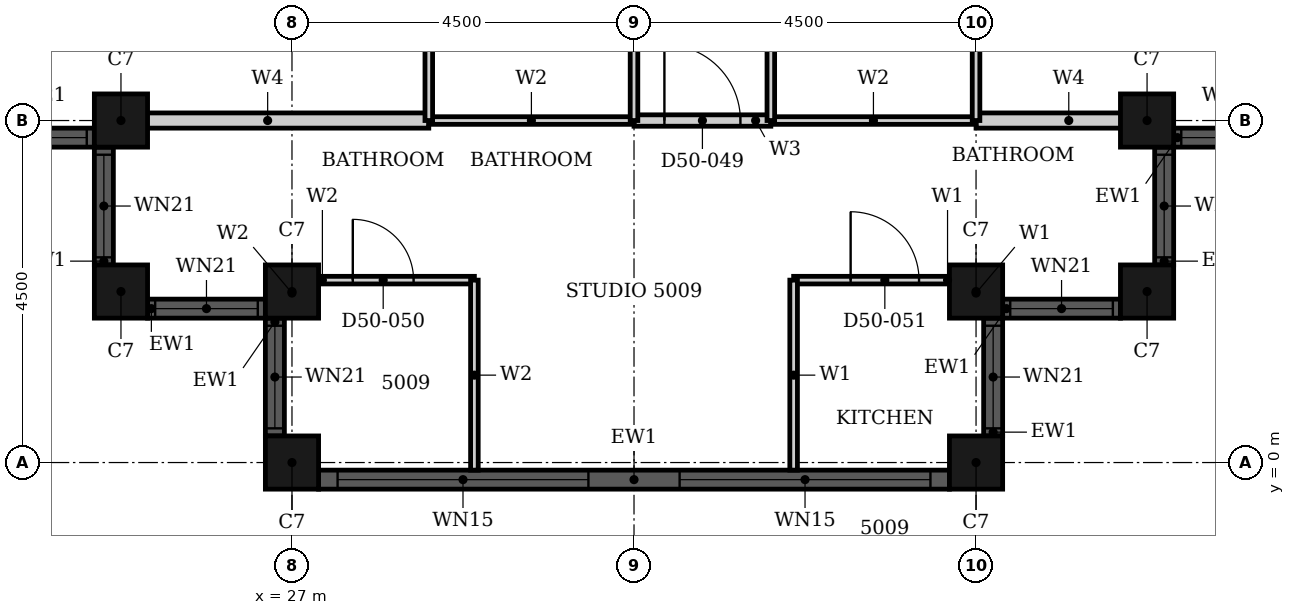
"""IFC4 building model, lengths in metres.
Left out: names, types, materials, properties, quantities, classifications, styles, units other than length and angle.
Written with IfcOpenShell. Run it as: python <this file> out.ifc"""

import sys

from ifc_helpers import new_model, si_unit, direction, frame, frame_2d, origin, origin_2d, place, context, subcontext, project, spatial, rectangle, hollow_rectangle, extrude, element, fill, save


model = new_model("IFC4")
c1 = context("Model", 3, precision=1e-05, world=origin(), true_north=direction((0.0, 1.0)))
c2 = subcontext(c1, "Body", "Model", "MODEL_VIEW")
j1 = project(units=[si_unit("LENGTHUNIT", "METRE"), si_unit("PLANEANGLEUNIT", "RADIAN")], contexts=[c1])
p1 = place(None, origin())
s1 = spatial("IfcSite", under=j1, at=p1, CompositionType="ELEMENT")
p2 = place(p1, origin())
s2 = spatial("IfcBuilding", under=s1, at=p2, CompositionType="ELEMENT")
p3 = place(p2, frame((0.0, 0.0, 199.8)))
s3 = spatial("IfcBuildingStorey", under=s2, at=p3, CompositionType="ELEMENT", Elevation=199.8)
for number, where, z_axis, x_axis in (
    (1, (24.75, 4.5, 0.0), (0.0, 0.0, 1.0), (1.0, 0.0, 0.0)),
    (2, (24.75, 2.25, 0.0), (0.0, 0.0, 1.0), (1.0, 0.0, 0.0)),
    (3, (27.0, 2.25, 0.0), (0.0, 0.0, 1.0), (1.0, 0.0, 0.0)),
    (4, (27.0, 0.0, 0.0), (0.0, 0.0, 1.0), (1.0, 0.0, 0.0)),
    (5, (36.0, 0.0, 0.0), (0.0, 0.0, 1.0), (1.0, 0.0, 0.0)),
    (6, (36.0, 2.25, 0.0), (0.0, 0.0, 1.0), (1.0, 0.0, 0.0)),
    (7, (38.25, 2.25, 0.0), (0.0, 0.0, 1.0), (1.0, 0.0, 0.0)),
    (8, (38.25, 4.5, 0.0), (0.0, 0.0, 1.0), (1.0, 0.0, 0.0)),
):
    element("IfcColumn", number, at=place(p3, frame(where, z_axis=z_axis, x_axis=x_axis)), inside=s3, PredefinedType="COLUMN", context=c2, shape_type="SweptSolid", body=[
        extrude(hollow_rectangle(XDim=0.7, YDim=0.7, WallThickness=0.022, at=origin_2d()), origin(), (0.0, 0.0, 1.0), 3.7),
    ])
p4 = place(p3, frame((22.85, 4.275, 0.0), z_axis=(0.0, 0.0, 1.0), x_axis=(1.0, 0.0, 0.0)))
e9 = element("IfcWall", 9, at=p4, inside=s3, PredefinedType="SOLIDWALL", context=c2, shape_type="SweptSolid", body=[
    extrude(rectangle(XDim=1.55, YDim=0.25, at=frame_2d((0.775, 0.0))), origin(), (0.0, 0.0, 1.0), 3.7),
])
p5 = place(p4, frame((0.1, 0.0, 0.9)))
e10 = element("IfcOpeningElement", 10, at=p5, cuts=e9, PredefinedType="OPENING", context=c2, shape_type="SweptSolid", body=[
    extrude(rectangle(XDim=1.35, YDim=1.85, at=frame_2d((0.675, 0.925))), frame((0.0, 0.135, 0.0), z_axis=(0.0, -1.0, 0.0), x_axis=(1.0, 0.0, 0.0)), (0.0, 0.0, 1.0), 0.27),
])
p6 = place(p3, frame((24.525, 4.15, 0.0), z_axis=(0.0, 0.0, 1.0), x_axis=(0.0, -1.0, 0.0)))
e11 = element("IfcWall", 11, at=p6, inside=s3, PredefinedType="SOLIDWALL", context=c2, shape_type="SweptSolid", body=[
    extrude(rectangle(XDim=1.55, YDim=0.25, at=frame_2d((0.775, 0.0))), origin(), (0.0, 0.0, 1.0), 3.7),
])
p7 = place(p6, frame((0.1, 0.0, 0.9)))
e12 = element("IfcOpeningElement", 12, at=p7, cuts=e11, PredefinedType="OPENING", context=c2, shape_type="SweptSolid", body=[
    extrude(rectangle(XDim=1.35, YDim=1.85, at=frame_2d((0.675, 0.925))), frame((0.0, 0.135, 0.0), z_axis=(0.0, -1.0, 0.0), x_axis=(1.0, 0.0, 0.0)), (0.0, 0.0, 1.0), 0.27),
])
p8 = place(p3, frame((25.1, 2.025, 0.0), z_axis=(0.0, 0.0, 1.0), x_axis=(1.0, 0.0, 0.0)))
e13 = element("IfcWall", 13, at=p8, inside=s3, PredefinedType="SOLIDWALL", context=c2, shape_type="SweptSolid", body=[
    extrude(rectangle(XDim=1.55, YDim=0.25, at=frame_2d((0.775, 0.0))), origin(), (0.0, 0.0, 1.0), 3.7),
])
p9 = place(p8, frame((0.1, 0.0, 0.9)))
e14 = element("IfcOpeningElement", 14, at=p9, cuts=e13, PredefinedType="OPENING", context=c2, shape_type="SweptSolid", body=[
    extrude(rectangle(XDim=1.35, YDim=1.85, at=frame_2d((0.675, 0.925))), frame((0.0, 0.135, 0.0), z_axis=(0.0, -1.0, 0.0), x_axis=(1.0, 0.0, 0.0)), (0.0, 0.0, 1.0), 0.27),
])
p10 = place(p3, frame((26.775, 1.9, 0.0), z_axis=(0.0, 0.0, 1.0), x_axis=(0.0, -1.0, 0.0)))
e15 = element("IfcWall", 15, at=p10, inside=s3, PredefinedType="SOLIDWALL", context=c2, shape_type="SweptSolid", body=[
    extrude(rectangle(XDim=1.55, YDim=0.25, at=frame_2d((0.775, 0.0))), origin(), (0.0, 0.0, 1.0), 3.7),
])
p11 = place(p10, frame((0.1, 0.0, 0.9)))
e16 = element("IfcOpeningElement", 16, at=p11, cuts=e15, PredefinedType="OPENING", context=c2, shape_type="SweptSolid", body=[
    extrude(rectangle(XDim=1.35, YDim=1.85, at=frame_2d((0.675, 0.925))), frame((0.0, 0.135, 0.0), z_axis=(0.0, -1.0, 0.0), x_axis=(1.0, 0.0, 0.0)), (0.0, 0.0, 1.0), 0.27),
])
p12 = place(p3, frame((27.35, -0.225, 0.0), z_axis=(0.0, 0.0, 1.0), x_axis=(1.0, 0.0, 0.0)))
e17 = element("IfcWall", 17, at=p12, inside=s3, PredefinedType="SOLIDWALL", context=c2, shape_type="SweptSolid", body=[
    extrude(rectangle(XDim=8.3, YDim=0.25, at=frame_2d((4.15, 0.0))), origin(), (0.0, 0.0, 1.0), 3.7),
])
p13 = place(p12, frame((0.25, 0.0, 0.45)))
e18 = element("IfcOpeningElement", 18, at=p13, cuts=e17, PredefinedType="OPENING", context=c2, shape_type="SweptSolid", body=[
    extrude(rectangle(XDim=3.3, YDim=2.3, at=frame_2d((1.65, 1.15))), frame((0.0, 0.135, 0.0), z_axis=(0.0, -1.0, 0.0), x_axis=(1.0, 0.0, 0.0)), (0.0, 0.0, 1.0), 0.27),
])
p14 = place(p12, frame((4.75, 0.0, 0.45)))
e19 = element("IfcOpeningElement", 19, at=p14, cuts=e17, PredefinedType="OPENING", context=c2, shape_type="SweptSolid", body=[
    extrude(rectangle(XDim=3.3, YDim=2.3, at=frame_2d((1.65, 1.15))), frame((0.0, 0.135, 0.0), z_axis=(0.0, -1.0, 0.0), x_axis=(1.0, 0.0, 0.0)), (0.0, 0.0, 1.0), 0.27),
])
p15 = place(p3, frame((36.225, 0.35, 0.0), z_axis=(0.0, 0.0, 1.0), x_axis=(0.0, 1.0, 0.0)))
e20 = element("IfcWall", 20, at=p15, inside=s3, PredefinedType="SOLIDWALL", context=c2, shape_type="SweptSolid", body=[
    extrude(rectangle(XDim=1.55, YDim=0.25, at=frame_2d((0.775, 0.0))), origin(), (0.0, 0.0, 1.0), 3.7),
])
p16 = place(p15, frame((0.1, 0.0, 0.9)))
e21 = element("IfcOpeningElement", 21, at=p16, cuts=e20, PredefinedType="OPENING", context=c2, shape_type="SweptSolid", body=[
    extrude(rectangle(XDim=1.35, YDim=1.85, at=frame_2d((0.675, 0.925))), frame((0.0, 0.135, 0.0), z_axis=(0.0, -1.0, 0.0), x_axis=(1.0, 0.0, 0.0)), (0.0, 0.0, 1.0), 0.27),
])
p17 = place(p3, frame((36.35, 2.025, 0.0), z_axis=(0.0, 0.0, 1.0), x_axis=(1.0, 0.0, 0.0)))
e22 = element("IfcWall", 22, at=p17, inside=s3, PredefinedType="SOLIDWALL", context=c2, shape_type="SweptSolid", body=[
    extrude(rectangle(XDim=1.55, YDim=0.25, at=frame_2d((0.775, 0.0))), origin(), (0.0, 0.0, 1.0), 3.7),
])
p18 = place(p17, frame((0.1, 0.0, 0.9)))
e23 = element("IfcOpeningElement", 23, at=p18, cuts=e22, PredefinedType="OPENING", context=c2, shape_type="SweptSolid", body=[
    extrude(rectangle(XDim=1.35, YDim=1.85, at=frame_2d((0.675, 0.925))), frame((0.0, 0.135, 0.0), z_axis=(0.0, -1.0, 0.0), x_axis=(1.0, 0.0, 0.0)), (0.0, 0.0, 1.0), 0.27),
])
p19 = place(p3, frame((38.475, 2.6, 0.0), z_axis=(0.0, 0.0, 1.0), x_axis=(0.0, 1.0, 0.0)))
e24 = element("IfcWall", 24, at=p19, inside=s3, PredefinedType="SOLIDWALL", context=c2, shape_type="SweptSolid", body=[
    extrude(rectangle(XDim=1.55, YDim=0.25, at=frame_2d((0.775, 0.0))), origin(), (0.0, 0.0, 1.0), 3.7),
])
p20 = place(p19, frame((0.1, 0.0, 0.9)))
e25 = element("IfcOpeningElement", 25, at=p20, cuts=e24, PredefinedType="OPENING", context=c2, shape_type="SweptSolid", body=[
    extrude(rectangle(XDim=1.35, YDim=1.85, at=frame_2d((0.675, 0.925))), frame((0.0, 0.135, 0.0), z_axis=(0.0, -1.0, 0.0), x_axis=(1.0, 0.0, 0.0)), (0.0, 0.0, 1.0), 0.27),
])
p21 = place(p3, frame((38.6, 4.275, 0.0), z_axis=(0.0, 0.0, 1.0), x_axis=(1.0, 0.0, 0.0)))
e26 = element("IfcWall", 26, at=p21, inside=s3, PredefinedType="SOLIDWALL", context=c2, shape_type="SweptSolid", body=[
    extrude(rectangle(XDim=1.55, YDim=0.25, at=frame_2d((0.775, 0.0))), origin(), (0.0, 0.0, 1.0), 3.7),
])
p22 = place(p21, frame((0.1, 0.0, 0.9)))
e27 = element("IfcOpeningElement", 27, at=p22, cuts=e26, PredefinedType="OPENING", context=c2, shape_type="SweptSolid", body=[
    extrude(rectangle(XDim=1.35, YDim=1.85, at=frame_2d((0.675, 0.925))), frame((0.0, 0.135, 0.0), z_axis=(0.0, -1.0, 0.0), x_axis=(1.0, 0.0, 0.0)), (0.0, 0.0, 1.0), 0.27),
])
p23 = place(p3, frame((31.5, 4.5, 0.0), z_axis=(0.0, 0.0, 1.0), x_axis=(1.0, 0.0, 0.0)))
e28 = element("IfcWall", 28, at=p23, inside=s3, PredefinedType="PARTITIONING", context=c2, shape_type="SweptSolid", body=[
    extrude(rectangle(XDim=1.8, YDim=0.15, at=frame_2d((0.9, 0.0))), origin(), (0.0, 0.0, 1.0), 3.4),
])
p24 = place(p23, frame((0.4, 0.0, 0.0)))
e29 = element("IfcOpeningElement", 29, at=p24, cuts=e28, PredefinedType="OPENING", context=c2, shape_type="SweptSolid", body=[
    extrude(rectangle(XDim=1.0, YDim=2.2, at=frame_2d((0.5, 1.1))), frame((0.0, 0.085, 0.0), z_axis=(0.0, -1.0, 0.0), x_axis=(1.0, 0.0, 0.0)), (0.0, 0.0, 1.0), 0.17),
])
p25 = place(p3, frame((33.6, 2.4, 0.0), z_axis=(0.0, 0.0, 1.0), x_axis=(1.0, 0.0, 0.0)))
e30 = element("IfcWall", 30, at=p25, inside=s3, PredefinedType="PARTITIONING", context=c2, shape_type="SweptSolid", body=[
    extrude(rectangle(XDim=2.4, YDim=0.1, at=frame_2d((1.2, 0.0))), origin(), (0.0, 0.0, 1.0), 3.4),
])
p26 = place(p25, frame((0.75, 0.0, 0.0)))
e31 = element("IfcOpeningElement", 31, at=p26, cuts=e30, PredefinedType="OPENING", context=c2, shape_type="SweptSolid", body=[
    extrude(rectangle(XDim=0.9, YDim=2.1, at=frame_2d((0.45, 1.05))), frame((0.0, 0.06, 0.0), z_axis=(0.0, -1.0, 0.0), x_axis=(1.0, 0.0, 0.0)), (0.0, 0.0, 1.0), 0.12),
])
p27 = place(p3, frame((33.6, -0.1, 0.0), z_axis=(0.0, 0.0, 1.0), x_axis=(0.0, 1.0, 0.0)))
e32 = element("IfcWall", 32, at=p27, inside=s3, PredefinedType="PARTITIONING", context=c2, shape_type="SweptSolid", body=[
    extrude(rectangle(XDim=2.5, YDim=0.1, at=frame_2d((1.25, 0.0))), origin(), (0.0, 0.0, 1.0), 3.4),
])
p28 = place(p3, frame((36.0, 2.06, 0.0), z_axis=(0.0, 0.0, 1.0), x_axis=(0.0, 1.0, 0.0)))
e33 = element("IfcWall", 33, at=p28, inside=s3, PredefinedType="PARTITIONING", context=c2, shape_type="SweptSolid", body=[
    extrude(rectangle(XDim=0.34, YDim=0.1, at=frame_2d((0.17, 0.0))), origin(), (0.0, 0.0, 1.0), 3.4),
])
p29 = place(p3, frame((36.0, 4.5, 0.0), z_axis=(0.0, 0.0, 1.0), x_axis=(1.0, 0.0, 0.0)))
e34 = element("IfcWall", 34, at=p29, inside=s3, PredefinedType="PARTITIONING", context=c2, shape_type="SweptSolid", body=[
    extrude(rectangle(XDim=2.44, YDim=0.2, at=frame_2d((1.22, 0.0))), origin(), (0.0, 0.0, 1.0), 3.4),
])
p30 = place(p3, frame((24.56, 4.5, 0.0), z_axis=(0.0, 0.0, 1.0), x_axis=(1.0, 0.0, 0.0)))
e35 = element("IfcWall", 35, at=p30, inside=s3, PredefinedType="PARTITIONING", context=c2, shape_type="SweptSolid", body=[
    extrude(rectangle(XDim=4.24, YDim=0.2, at=frame_2d((2.12, 0.0))), origin(), (0.0, 0.0, 1.0), 3.4),
])
p31 = place(p3, frame((27.0, 2.4, 0.0), z_axis=(0.0, 0.0, 1.0), x_axis=(1.0, 0.0, 0.0)))
e36 = element("IfcWall", 36, at=p31, inside=s3, PredefinedType="PARTITIONING", context=c2, shape_type="SweptSolid", body=[
    extrude(rectangle(XDim=2.4, YDim=0.1, at=frame_2d((1.2, 0.0))), origin(), (0.0, 0.0, 1.0), 3.4),
])
p32 = place(p31, frame((0.8, 0.0, 0.0)))
e37 = element("IfcOpeningElement", 37, at=p32, cuts=e36, PredefinedType="OPENING", context=c2, shape_type="SweptSolid", body=[
    extrude(rectangle(XDim=0.8, YDim=2.1, at=frame_2d((0.4, 1.05))), frame((0.0, 0.06, 0.0), z_axis=(0.0, -1.0, 0.0), x_axis=(1.0, 0.0, 0.0)), (0.0, 0.0, 1.0), 0.12),
])
for number, where, z_axis, x_axis in (
    (38, (33.3, 4.5, 0.0), (0.0, 0.0, 1.0), (1.0, 0.0, 0.0)),
    (39, (28.8, 4.5, 0.0), (0.0, 0.0, 1.0), (1.0, 0.0, 0.0)),
):
    element("IfcWall", number, at=place(p3, frame(where, z_axis=z_axis, x_axis=x_axis)), inside=s3, PredefinedType="PARTITIONING", context=c2, shape_type="SweptSolid", body=[
        extrude(rectangle(XDim=2.7, YDim=0.1, at=frame_2d((1.35, 0.0))), origin(), (0.0, 0.0, 1.0), 3.4),
    ])
p33 = place(p3, frame((27.0, 2.06, 0.0), z_axis=(0.0, 0.0, 1.0), x_axis=(0.0, 1.0, 0.0)))
e40 = element("IfcWall", 40, at=p33, inside=s3, PredefinedType="PARTITIONING", context=c2, shape_type="SweptSolid", body=[
    extrude(rectangle(XDim=0.34, YDim=0.1, at=frame_2d((0.17, 0.0))), origin(), (0.0, 0.0, 1.0), 3.4),
])
p34 = place(p3, frame((28.8, 4.5, 0.0), z_axis=(0.0, 0.0, 1.0), x_axis=(0.0, 1.0, 0.0)))
e41 = element("IfcWall", 41, at=p34, inside=s3, PredefinedType="PARTITIONING", context=c2, shape_type="SweptSolid", body=[
    extrude(rectangle(XDim=2.4, YDim=0.1, at=frame_2d((1.2, 0.0))), origin(), (0.0, 0.0, 1.0), 3.4),
])
p35 = place(p3, frame((29.4, -0.1, 0.0), z_axis=(0.0, 0.0, 1.0), x_axis=(0.0, 1.0, 0.0)))
e42 = element("IfcWall", 42, at=p35, inside=s3, PredefinedType="PARTITIONING", context=c2, shape_type="SweptSolid", body=[
    extrude(rectangle(XDim=2.5, YDim=0.1, at=frame_2d((1.25, 0.0))), origin(), (0.0, 0.0, 1.0), 3.4),
])
p36 = place(p3, frame((31.5, 4.5, 0.0), z_axis=(0.0, 0.0, 1.0), x_axis=(0.0, 1.0, 0.0)))
e43 = element("IfcWall", 43, at=p36, inside=s3, PredefinedType="PARTITIONING", context=c2, shape_type="SweptSolid", body=[
    extrude(rectangle(XDim=2.4, YDim=0.1, at=frame_2d((1.2, 0.0))), origin(), (0.0, 0.0, 1.0), 2.68),
])
p37 = place(p3, frame((33.3, 4.5, 0.0), z_axis=(0.0, 0.0, 1.0), x_axis=(0.0, 1.0, 0.0)))
e44 = element("IfcWall", 44, at=p37, inside=s3, PredefinedType="PARTITIONING", context=c2, shape_type="SweptSolid", body=[
    extrude(rectangle(XDim=2.4, YDim=0.1, at=frame_2d((1.2, 0.0))), origin(), (0.0, 0.0, 1.0), 3.4),
])
p38 = place(p3, frame((36.0, 4.5, 0.0), z_axis=(0.0, 0.0, 1.0), x_axis=(0.0, 1.0, 0.0)))
e45 = element("IfcWall", 45, at=p38, inside=s3, PredefinedType="PARTITIONING", context=c2, shape_type="SweptSolid", body=[
    extrude(rectangle(XDim=2.4, YDim=0.1, at=frame_2d((1.2, 0.0))), origin(), (0.0, 0.0, 1.0), 2.68),
])
p39 = place(p5, origin())
e46 = element("IfcWindow", 46, at=p39, inside=s3, PartitioningType="SINGLE_PANEL", PredefinedType="WINDOW", context=c2, shape_type="SweptSolid", body=[
    extrude(rectangle(XDim=1.35, YDim=1.85, at=frame_2d((0.675, 0.925))), frame((0.0, 0.03, 0.0), z_axis=(0.0, -1.0, 0.0), x_axis=(1.0, 0.0, 0.0)), (0.0, 0.0, 1.0), 0.06),
])
fill(e10, e46)
p40 = place(p7, origin())
e47 = element("IfcWindow", 47, at=p40, inside=s3, PartitioningType="SINGLE_PANEL", PredefinedType="WINDOW", context=c2, shape_type="SweptSolid", body=[
    extrude(rectangle(XDim=1.35, YDim=1.85, at=frame_2d((0.675, 0.925))), frame((0.0, 0.03, 0.0), z_axis=(0.0, -1.0, 0.0), x_axis=(1.0, 0.0, 0.0)), (0.0, 0.0, 1.0), 0.06),
])
fill(e12, e47)
p41 = place(p9, origin())
e48 = element("IfcWindow", 48, at=p41, inside=s3, PartitioningType="SINGLE_PANEL", PredefinedType="WINDOW", context=c2, shape_type="SweptSolid", body=[
    extrude(rectangle(XDim=1.35, YDim=1.85, at=frame_2d((0.675, 0.925))), frame((0.0, 0.03, 0.0), z_axis=(0.0, -1.0, 0.0), x_axis=(1.0, 0.0, 0.0)), (0.0, 0.0, 1.0), 0.06),
])
fill(e14, e48)
p42 = place(p11, origin())
e49 = element("IfcWindow", 49, at=p42, inside=s3, PartitioningType="SINGLE_PANEL", PredefinedType="WINDOW", context=c2, shape_type="SweptSolid", body=[
    extrude(rectangle(XDim=1.35, YDim=1.85, at=frame_2d((0.675, 0.925))), frame((0.0, 0.03, 0.0), z_axis=(0.0, -1.0, 0.0), x_axis=(1.0, 0.0, 0.0)), (0.0, 0.0, 1.0), 0.06),
])
fill(e16, e49)
p43 = place(p13, origin())
e50 = element("IfcWindow", 50, at=p43, inside=s3, PartitioningType="SINGLE_PANEL", PredefinedType="WINDOW", context=c2, shape_type="SweptSolid", body=[
    extrude(rectangle(XDim=3.3, YDim=2.3, at=frame_2d((1.65, 1.15))), frame((0.0, 0.03, 0.0), z_axis=(0.0, -1.0, 0.0), x_axis=(1.0, 0.0, 0.0)), (0.0, 0.0, 1.0), 0.06),
])
fill(e18, e50)
p44 = place(p14, origin())
e51 = element("IfcWindow", 51, at=p44, inside=s3, PartitioningType="SINGLE_PANEL", PredefinedType="WINDOW", context=c2, shape_type="SweptSolid", body=[
    extrude(rectangle(XDim=3.3, YDim=2.3, at=frame_2d((1.65, 1.15))), frame((0.0, 0.03, 0.0), z_axis=(0.0, -1.0, 0.0), x_axis=(1.0, 0.0, 0.0)), (0.0, 0.0, 1.0), 0.06),
])
fill(e19, e51)
p45 = place(p16, origin())
e52 = element("IfcWindow", 52, at=p45, inside=s3, PartitioningType="SINGLE_PANEL", PredefinedType="WINDOW", context=c2, shape_type="SweptSolid", body=[
    extrude(rectangle(XDim=1.35, YDim=1.85, at=frame_2d((0.675, 0.925))), frame((0.0, 0.03, 0.0), z_axis=(0.0, -1.0, 0.0), x_axis=(1.0, 0.0, 0.0)), (0.0, 0.0, 1.0), 0.06),
])
fill(e21, e52)
p46 = place(p18, origin())
e53 = element("IfcWindow", 53, at=p46, inside=s3, PartitioningType="SINGLE_PANEL", PredefinedType="WINDOW", context=c2, shape_type="SweptSolid", body=[
    extrude(rectangle(XDim=1.35, YDim=1.85, at=frame_2d((0.675, 0.925))), frame((0.0, 0.03, 0.0), z_axis=(0.0, -1.0, 0.0), x_axis=(1.0, 0.0, 0.0)), (0.0, 0.0, 1.0), 0.06),
])
fill(e23, e53)
p47 = place(p20, origin())
e54 = element("IfcWindow", 54, at=p47, inside=s3, PartitioningType="SINGLE_PANEL", PredefinedType="WINDOW", context=c2, shape_type="SweptSolid", body=[
    extrude(rectangle(XDim=1.35, YDim=1.85, at=frame_2d((0.675, 0.925))), frame((0.0, 0.03, 0.0), z_axis=(0.0, -1.0, 0.0), x_axis=(1.0, 0.0, 0.0)), (0.0, 0.0, 1.0), 0.06),
])
fill(e25, e54)
p48 = place(p22, origin())
e55 = element("IfcWindow", 55, at=p48, inside=s3, PartitioningType="SINGLE_PANEL", PredefinedType="WINDOW", context=c2, shape_type="SweptSolid", body=[
    extrude(rectangle(XDim=1.35, YDim=1.85, at=frame_2d((0.675, 0.925))), frame((0.0, 0.03, 0.0), z_axis=(0.0, -1.0, 0.0), x_axis=(1.0, 0.0, 0.0)), (0.0, 0.0, 1.0), 0.06),
])
fill(e27, e55)
p49 = place(p24, origin())
e56 = element("IfcDoor", 56, at=p49, inside=s3, OperationType="SINGLE_SWING_RIGHT", PredefinedType="DOOR", context=c2, shape_type="SweptSolid", body=[
    extrude(rectangle(XDim=1.0, YDim=2.2, at=frame_2d((0.5, 1.1))), frame((0.0, 0.025, 0.0), z_axis=(0.0, -1.0, 0.0), x_axis=(1.0, 0.0, 0.0)), (0.0, 0.0, 1.0), 0.05),
])
fill(e29, e56)
p50 = place(p32, origin())
e57 = element("IfcDoor", 57, at=p50, inside=s3, OperationType="SINGLE_SWING_RIGHT", PredefinedType="DOOR", context=c2, shape_type="SweptSolid", body=[
    extrude(rectangle(XDim=0.8, YDim=2.1, at=frame_2d((0.4, 1.05))), frame((0.0, 0.025, 0.0), z_axis=(0.0, -1.0, 0.0), x_axis=(1.0, 0.0, 0.0)), (0.0, 0.0, 1.0), 0.05),
])
fill(e37, e57)
p51 = place(p26, origin())
e58 = element("IfcDoor", 58, at=p51, inside=s3, OperationType="SINGLE_SWING_RIGHT", PredefinedType="DOOR", context=c2, shape_type="SweptSolid", body=[
    extrude(rectangle(XDim=0.9, YDim=2.1, at=frame_2d((0.45, 1.05))), frame((0.0, 0.025, 0.0), z_axis=(0.0, -1.0, 0.0), x_axis=(1.0, 0.0, 0.0)), (0.0, 0.0, 1.0), 0.05),
])
fill(e31, e58)
save(model, sys.argv[1])
